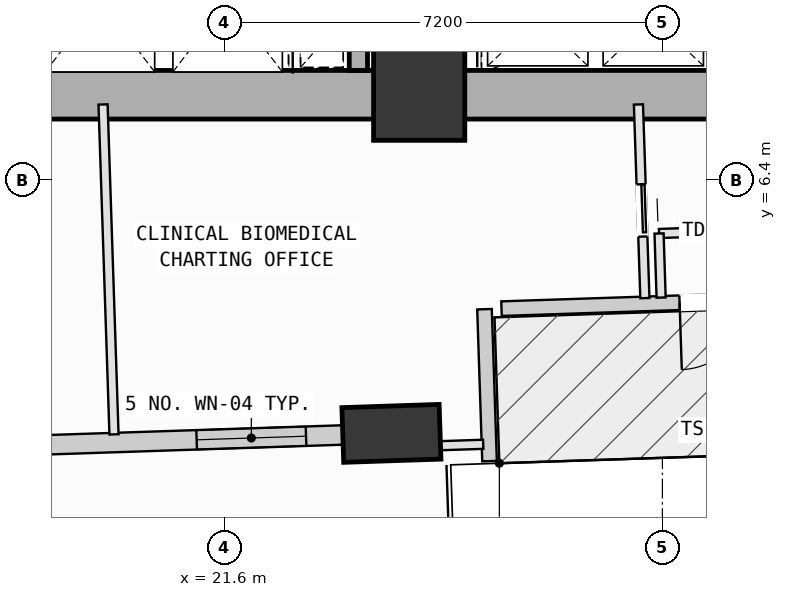
"""IFC4 building model, lengths in metres.
Left out: names, types, materials, properties, quantities, classifications, styles, units other than length and angle.
Written with IfcOpenShell. Run it as: python <this file> out.ifc"""

import sys

from ifc_helpers import new_model, si_unit, direction, frame, frame_2d, origin, origin_2d, place, context, subcontext, project, spatial, rectangle, extrude, element, fill, save


model = new_model("IFC4")
c1 = context("Model", 3, precision=1e-05, world=origin(), true_north=direction((0.0, 1.0)))
c2 = subcontext(c1, "Body", "Model", "MODEL_VIEW")
j1 = project(units=[si_unit("LENGTHUNIT", "METRE"), si_unit("PLANEANGLEUNIT", "RADIAN")], contexts=[c1])
p1 = place(None, origin())
s1 = spatial("IfcSite", under=j1, at=p1, CompositionType="ELEMENT")
p2 = place(p1, origin())
s2 = spatial("IfcBuilding", under=s1, at=p2, CompositionType="ELEMENT")
p3 = place(p2, frame((0.0, 0.0, 31.0)))
s3 = spatial("IfcBuildingStorey", under=s2, at=p3, CompositionType="ELEMENT", Elevation=31.0)
p4 = place(p3, frame((24.8, 7.8, 0.0), z_axis=(0.0, 0.0, 1.0), x_axis=(1.0, 0.0, 0.0)))
e1 = element("IfcColumn", 1, at=p4, inside=s3, PredefinedType="COLUMN", context=c2, shape_type="SweptSolid", body=[
    extrude(rectangle(XDim=1.5, YDim=1.5, at=origin_2d()), origin(), (0.0, 0.0, 1.0), 4.0),
])
p5 = place(p3, frame((24.343, 2.231, 0.002), z_axis=(0.093414591614, -0.037438769313, 0.994923139054), x_axis=(0.341191535145, 0.939987873879, 0.003336661014)))
e2 = element("IfcColumn", 2, at=p5, inside=s3, PredefinedType="COLUMN", context=c2, shape_type="SweptSolid", body=[
    extrude(rectangle(XDim=1.6, YDim=0.9, at=origin_2d()), origin(), (0.0, 0.0, 1.0), 4.017),
])
p6 = place(p3, frame((33.11, 4.513, 0.0), z_axis=(0.0, 0.0, 1.0), x_axis=(-0.999450421649, -0.033148976852, 0.0)))
e3 = element("IfcWall", 3, at=p6, inside=s3, PredefinedType="SOLIDWALL", context=c2, shape_type="SweptSolid", body=[
    extrude(rectangle(XDim=6.96, YDim=0.24, at=frame_2d((3.48, 0.0))), origin(), (0.0, 0.0, 1.0), 3.165),
])
p7 = place(p6, frame((2.93, 0.0, 0.0)))
e4 = element("IfcOpeningElement", 4, at=p7, cuts=e3, PredefinedType="OPENING", context=c2, shape_type="SweptSolid", body=[
    extrude(rectangle(XDim=1.1, YDim=2.15, at=frame_2d((0.55, 1.075))), frame((0.0, 0.13, 0.0), z_axis=(0.0, -1.0, 0.0), x_axis=(1.0, 0.0, 0.0)), (0.0, 0.0, 1.0), 0.26),
])
p8 = place(p3, frame((25.874, 4.273, 0.0), z_axis=(0.0, 0.0, 1.0), x_axis=(0.033201031352, -0.999448693789, 0.0)))
e5 = element("IfcWall", 5, at=p8, inside=s3, PredefinedType="SOLIDWALL", context=c2, shape_type="SweptSolid", body=[
    extrude(rectangle(XDim=2.5, YDim=0.24, at=frame_2d((1.25, 0.0))), origin(), (0.0, 0.0, 1.0), 3.165),
])
p9 = place(p3, frame((23.926, 2.217, 0.0), z_axis=(0.0, 0.0, 1.0), x_axis=(-0.999449723899, -0.033170007512, 0.0)))
e6 = element("IfcWall", 6, at=p9, inside=s3, PredefinedType="SOLIDWALL", context=c2, shape_type="SweptSolid", body=[
    extrude(rectangle(XDim=6.006, YDim=0.32, at=frame_2d((3.003, 0.0))), origin(), (0.0, 0.0, 1.0), 3.165),
])
p10 = place(p9, frame((0.988, 0.0, 0.75)))
e7 = element("IfcOpeningElement", 7, at=p10, cuts=e6, PredefinedType="OPENING", context=c2, shape_type="SweptSolid", body=[
    extrude(rectangle(XDim=1.8, YDim=2.05, at=frame_2d((0.9, 1.025))), frame((0.0, 0.17, 0.0), z_axis=(0.0, -1.0, 0.0), x_axis=(1.0, 0.0, 0.0)), (0.0, 0.0, 1.0), 0.34),
])
for number, where, z_axis, x_axis in (
    (8, (14.0, 7.8, 0.0), (0.0, 0.0, 1.0), (1.0, 0.0, 0.0)),
    (9, (24.8, 7.8, 0.0), (0.0, 0.0, 1.0), (1.0, 0.0, 0.0)),
):
    element("IfcWall", number, at=place(p3, frame(where, z_axis=z_axis, x_axis=x_axis)), inside=s3, PredefinedType="SHEAR", context=c2, shape_type="SweptSolid", body=[
        extrude(rectangle(XDim=10.8, YDim=0.8, at=frame_2d((5.4, 0.0))), origin(), (0.0, 0.0, 1.0), 3.78),
    ])
p11 = place(p3, frame((23.8, 8.2, 0.0), z_axis=(0.0, 0.0, 1.0), x_axis=(0.0, 1.0, 0.0)))
e10 = element("IfcWall", 10, at=p11, inside=s3, PredefinedType="SOLIDWALL", context=c2, shape_type="SweptSolid", body=[
    extrude(rectangle(XDim=2.48, YDim=0.3, at=frame_2d((1.24, 0.0))), origin(), (0.0, 0.0, 1.0), 3.78),
])
p12 = place(p3, frame((19.601, 7.64, 0.0), z_axis=(0.0, 0.0, 1.0), x_axis=(0.033144127038, -0.999450582492, 0.0)))
e11 = element("IfcWall", 11, at=p12, inside=s3, PredefinedType="PARTITIONING", context=c2, shape_type="SweptSolid", body=[
    extrude(rectangle(XDim=5.429, YDim=0.15, at=frame_2d((2.714, 0.0))), origin(), (0.0, 0.0, 1.0), 3.78),
])
p13 = place(p3, frame((25.853, 2.051, 0.0), z_axis=(0.0, 0.0, 1.0), x_axis=(-0.999445267539, -0.033304011678, 0.0)))
e12 = element("IfcWall", 12, at=p13, inside=s3, PredefinedType="PARTITIONING", context=c2, shape_type="SweptSolid", body=[
    extrude(rectangle(XDim=1.503, YDim=0.15, at=frame_2d((0.751, 0.0))), origin(), (0.0, 0.0, 1.0), 3.145),
])
p14 = place(p3, frame((28.406, 7.64, 0.0), z_axis=(0.0, 0.0, 1.0), x_axis=(0.033251054915, -0.999447030786, 0.0)))
e13 = element("IfcWall", 13, at=p14, inside=s3, PredefinedType="PARTITIONING", context=c2, shape_type="SweptSolid", body=[
    extrude(rectangle(XDim=3.187, YDim=0.15, at=frame_2d((1.593, 0.0))), origin(), (0.0, 0.0, 1.0), 3.78),
])
p15 = place(p14, frame((1.313, 0.0, 0.0)))
e14 = element("IfcOpeningElement", 14, at=p15, cuts=e13, PredefinedType="OPENING", context=c2, shape_type="SweptSolid", body=[
    extrude(rectangle(XDim=0.86, YDim=2.06, at=frame_2d((0.43, 1.03))), frame((0.0, 0.085, 0.0), z_axis=(0.0, -1.0, 0.0), x_axis=(1.0, 0.0, 0.0)), (0.0, 0.0, 1.0), 0.17),
])
p16 = place(p3, frame((30.444, 5.575, 0.0), z_axis=(0.0, 0.0, 1.0), x_axis=(-0.999439954622, -0.033463070761, 0.0)))
e15 = element("IfcWall", 15, at=p16, inside=s3, PredefinedType="PARTITIONING", context=c2, shape_type="SweptSolid", body=[
    extrude(rectangle(XDim=1.7, YDim=0.15, at=frame_2d((0.85, 0.0))), origin(), (0.0, 0.0, 1.0), 3.78),
])
p17 = place(p3, frame((28.745, 5.518, 0.0), z_axis=(0.0, 0.0, 1.0), x_axis=(0.032181608355, -0.999482037899, 0.0)))
e16 = element("IfcWall", 16, at=p17, inside=s3, PredefinedType="PARTITIONING", context=c2, shape_type="SweptSolid", body=[
    extrude(rectangle(XDim=1.054, YDim=0.15, at=frame_2d((0.527, 0.0))), origin(), (0.0, 0.0, 1.0), 3.78),
])
p18 = place(p7, origin())
e17 = element("IfcDoor", 17, at=p18, inside=s3, OperationType="SINGLE_SWING_RIGHT", PredefinedType="DOOR", context=c2, shape_type="SweptSolid", body=[
    extrude(rectangle(XDim=1.1, YDim=2.15, at=frame_2d((0.55, 1.075))), frame((0.0, 0.025, 0.0), z_axis=(0.0, -1.0, 0.0), x_axis=(1.0, 0.0, 0.0)), (0.0, 0.0, 1.0), 0.05),
])
fill(e4, e17)
p19 = place(p10, origin())
e18 = element("IfcWindow", 18, at=p19, inside=s3, PartitioningType="SINGLE_PANEL", PredefinedType="WINDOW", context=c2, shape_type="SweptSolid", body=[
    extrude(rectangle(XDim=1.8, YDim=2.05, at=frame_2d((0.9, 1.025))), frame((0.0, 0.03, 0.0), z_axis=(0.0, -1.0, 0.0), x_axis=(1.0, 0.0, 0.0)), (0.0, 0.0, 1.0), 0.06),
])
fill(e7, e18)
p20 = place(p15, origin())
e19 = element("IfcDoor", 19, at=p20, inside=s3, OperationType="SLIDING_TO_LEFT", PredefinedType="DOOR", context=c2, shape_type="SweptSolid", body=[
    extrude(rectangle(XDim=0.86, YDim=2.06, at=frame_2d((0.43, 1.03))), frame((0.0, 0.025, 0.0), z_axis=(0.0, -1.0, 0.0), x_axis=(1.0, 0.0, 0.0)), (0.0, 0.0, 1.0), 0.05),
])
fill(e14, e19)
save(model, sys.argv[1])
